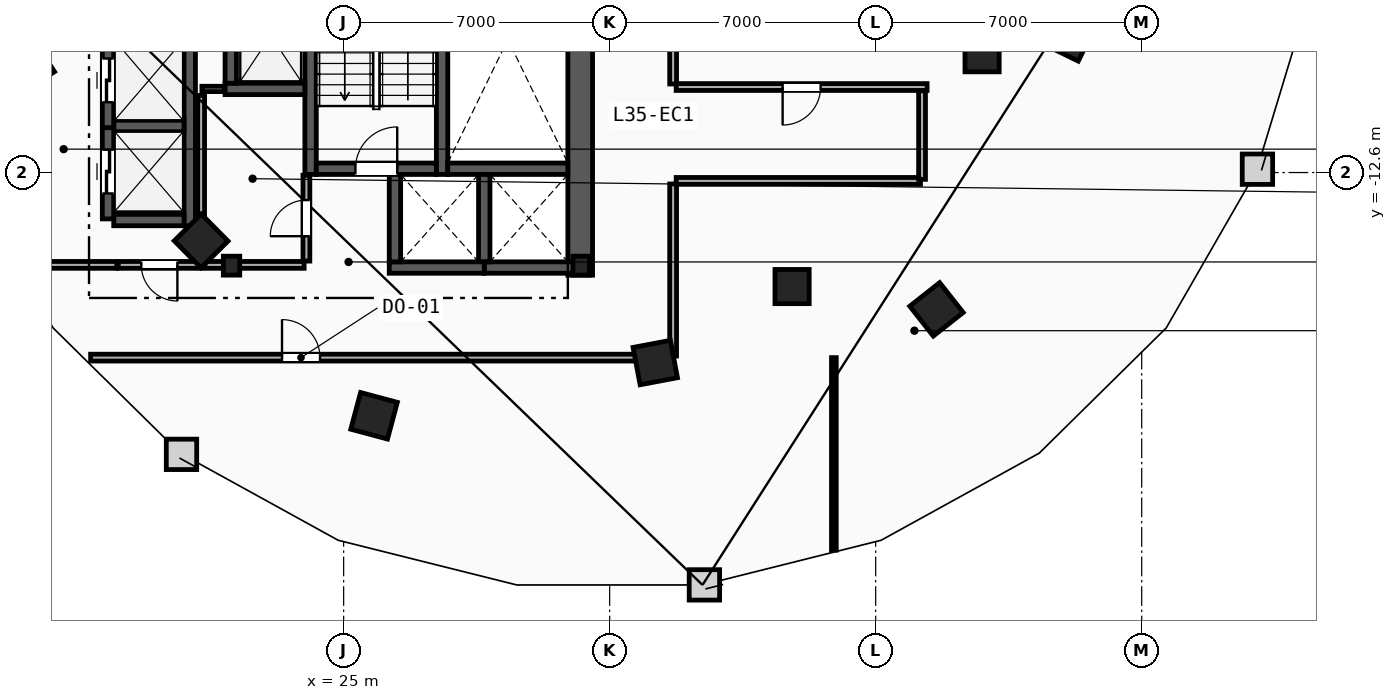
"""IFC4 building model, lengths in metres.
Left out: names, types, materials, properties, quantities, classifications, styles, units other than length and angle.
Written with IfcOpenShell. Run it as: python <this file> out.ifc"""

import sys

from ifc_helpers import new_model, si_unit, direction, frame, frame_2d, origin, origin_2d, place, context, subcontext, project, spatial, rectangle, i_section, extrude, element, fill, save


model = new_model("IFC4")
c1 = context("Model", 3, precision=1e-05, world=origin(), true_north=direction((0.0, 1.0)))
c2 = subcontext(c1, "Body", "Model", "MODEL_VIEW")
j1 = project(units=[si_unit("LENGTHUNIT", "METRE"), si_unit("PLANEANGLEUNIT", "RADIAN")], contexts=[c1])
p1 = place(None, origin())
s1 = spatial("IfcSite", under=j1, at=p1, CompositionType="ELEMENT")
p2 = place(p1, origin())
s2 = spatial("IfcBuilding", under=s1, at=p2, CompositionType="ELEMENT")
p3 = place(p2, frame((0.0, 0.0, 136.8)))
s3 = spatial("IfcBuildingStorey", under=s2, at=p3, CompositionType="ELEMENT", Elevation=136.8)
for number, where, z_axis, x_axis in (
    (1, (22.05, -15.05, 0.0), (0.0, 0.0, 1.0), (1.0, 0.0, 0.0)),
    (2, (31.25, -15.05, 0.0), (0.0, 0.0, 1.0), (1.0, 0.0, 0.0)),
):
    element("IfcColumn", number, at=place(p3, frame(where, z_axis=z_axis, x_axis=x_axis)), inside=s3, PredefinedType="COLUMN", context=c2, shape_type="SweptSolid", body=[
        extrude(i_section(OverallWidth=0.432, OverallDepth=0.498, WebThickness=0.056, FlangeThickness=0.089, FilletRadius=0.018, at=origin_2d()), origin(), (0.0, 0.0, 1.0), 3.6),
    ])
for number, where, z_axis, x_axis in (
    (3, (41.8, -9.5, 0.0), (0.0, 0.0, 1.0), (1.0, 0.0, 0.0)),
    (4, (36.8, -15.6, 0.0), (0.0, 0.0, 1.0), (1.0, 0.0, 0.0)),
):
    element("IfcColumn", number, at=place(p3, frame(where, z_axis=z_axis, x_axis=x_axis)), inside=s3, PredefinedType="COLUMN", context=c2, shape_type="SweptSolid", body=[
        extrude(rectangle(XDim=0.9, YDim=0.9, at=origin_2d()), origin(), (0.0, 0.0, 1.0), 3.6),
    ])
for number, where, z_axis, x_axis in (
    (5, (16.7, -9.8, 0.0), (0.0, 0.0, 1.0), (0.544, -0.839, 0.0)),
    (6, (21.25, -14.4, 0.0), (0.0, 0.0, 1.0), (0.703, -0.711, 0.0)),
    (7, (25.8, -19.0, 0.0), (0.0, 0.0, 1.0), (0.966, -0.259, 0.0)),
    (8, (33.2, -17.6, 0.0), (0.0, 0.0, 1.0), (0.983, 0.186, 0.0)),
    (9, (40.6, -16.2, 0.0), (0.0, 0.0, 1.0), (0.785, 0.619, 0.0)),
    (10, (44.1, -9.0, 0.0), (0.0, 0.0, 1.0), (0.437, 0.899, 0.0)),
):
    element("IfcColumn", number, at=place(p3, frame(where, z_axis=z_axis, x_axis=x_axis)), inside=s3, PredefinedType="COLUMN", context=c2, shape_type="SweptSolid", body=[
        extrude(rectangle(XDim=1.0, YDim=1.0, at=origin_2d()), origin(), (0.0, 0.0, 1.0), 3.6),
    ])
p4 = place(p3, frame((31.225, -15.3, 0.0), z_axis=(0.0, 0.0, 1.0), x_axis=(0.0, 1.0, 0.0)))
e11 = element("IfcWall", 11, at=p4, inside=s3, PredefinedType="SHEAR", context=c2, shape_type="SweptSolid", body=[
    extrude(rectangle(XDim=13.33, YDim=0.65, at=frame_2d((6.665, 0.0))), origin(), (0.0, 0.0, 1.0), 3.36),
])
for number, where, z_axis, x_axis in (
    (12, (27.59, -12.65, 0.0), (0.0, 0.0, 1.0), (0.0, 1.0, 0.0)),
    (13, (24.13, -12.65, 0.0), (0.0, 0.0, 1.0), (0.0, 1.0, 0.0)),
):
    element("IfcWall", number, at=place(p3, frame(where, z_axis=z_axis, x_axis=x_axis)), inside=s3, PredefinedType="SHEAR", context=c2, shape_type="SweptSolid", body=[
        extrude(rectangle(XDim=10.68, YDim=0.3, at=frame_2d((5.34, 0.0))), origin(), (0.0, 0.0, 1.0), 3.36),
    ])
p5 = place(p3, frame((27.74, -12.5, 0.0), z_axis=(0.0, 0.0, 1.0), x_axis=(1.0, 0.0, 0.0)))
e14 = element("IfcWall", 14, at=p5, inside=s3, PredefinedType="SHEAR", context=c2, shape_type="SweptSolid", body=[
    extrude(rectangle(XDim=3.16, YDim=0.3, at=frame_2d((1.58, 0.0))), origin(), (0.0, 0.0, 1.0), 3.36),
])
p6 = place(p3, frame((24.28, -12.5, 0.0), z_axis=(0.0, 0.0, 1.0), x_axis=(1.0, 0.0, 0.0)))
e15 = element("IfcWall", 15, at=p6, inside=s3, PredefinedType="SHEAR", context=c2, shape_type="SweptSolid", body=[
    extrude(rectangle(XDim=3.16, YDim=0.3, at=frame_2d((1.58, 0.0))), origin(), (0.0, 0.0, 1.0), 3.36),
])
p7 = place(p6, frame((1.03, 0.0, 0.0)))
e16 = element("IfcOpeningElement", 16, at=p7, cuts=e15, PredefinedType="OPENING", context=c2, shape_type="SweptSolid", body=[
    extrude(rectangle(XDim=1.1, YDim=2.15, at=frame_2d((0.55, 1.075))), frame((0.0, 0.16, 0.0), z_axis=(0.0, -1.0, 0.0), x_axis=(1.0, 0.0, 0.0)), (0.0, 0.0, 1.0), 0.32),
])
p8 = place(p3, frame((21.88, -10.4, 0.0), z_axis=(0.0, 0.0, 1.0), x_axis=(1.0, 0.0, 0.0)))
e17 = element("IfcWall", 17, at=p8, inside=s3, PredefinedType="SHEAR", context=c2, shape_type="SweptSolid", body=[
    extrude(rectangle(XDim=2.1, YDim=0.3, at=frame_2d((1.05, 0.0))), origin(), (0.0, 0.0, 1.0), 3.36),
])
for number, where, z_axis, x_axis in (
    (18, (22.03, -10.25, 0.0), (0.0, 0.0, 1.0), (0.0, 1.0, 0.0)),
    (19, (28.7, -15.1, 0.0), (0.0, 0.0, 1.0), (1.0, 0.0, 0.0)),
):
    element("IfcWall", number, at=place(p3, frame(where, z_axis=z_axis, x_axis=x_axis)), inside=s3, PredefinedType="SHEAR", context=c2, shape_type="SweptSolid", body=[
        extrude(rectangle(XDim=2.5, YDim=0.3, at=frame_2d((1.25, 0.0))), origin(), (0.0, 0.0, 1.0), 3.36),
    ])
p9 = place(p3, frame((28.7, -14.95, 0.0), z_axis=(0.0, 0.0, 1.0), x_axis=(0.0, 1.0, 0.0)))
e20 = element("IfcWall", 20, at=p9, inside=s3, PredefinedType="SHEAR", context=c2, shape_type="SweptSolid", body=[
    extrude(rectangle(XDim=2.3, YDim=0.3, at=frame_2d((1.15, 0.0))), origin(), (0.0, 0.0, 1.0), 3.36),
])
p10 = place(p3, frame((26.2, -15.1, 0.0), z_axis=(0.0, 0.0, 1.0), x_axis=(1.0, 0.0, 0.0)))
e21 = element("IfcWall", 21, at=p10, inside=s3, PredefinedType="SHEAR", context=c2, shape_type="SweptSolid", body=[
    extrude(rectangle(XDim=2.5, YDim=0.3, at=frame_2d((1.25, 0.0))), origin(), (0.0, 0.0, 1.0), 3.36),
])
p11 = place(p3, frame((26.35, -14.95, 0.0), z_axis=(0.0, 0.0, 1.0), x_axis=(0.0, 1.0, 0.0)))
e22 = element("IfcWall", 22, at=p11, inside=s3, PredefinedType="SHEAR", context=c2, shape_type="SweptSolid", body=[
    extrude(rectangle(XDim=2.3, YDim=0.3, at=frame_2d((1.15, 0.0))), origin(), (0.0, 0.0, 1.0), 3.36),
])
p12 = place(p3, frame((20.95, -14.0, 0.0), z_axis=(0.0, 0.0, 1.0), x_axis=(0.0, 1.0, 0.0)))
e23 = element("IfcWall", 23, at=p12, inside=s3, PredefinedType="SHEAR", context=c2, shape_type="SweptSolid", body=[
    extrude(rectangle(XDim=5.25, YDim=0.3, at=frame_2d((2.625, 0.0))), origin(), (0.0, 0.0, 1.0), 3.36),
])
for number, where, z_axis, x_axis in (
    (24, (18.95, -13.85, 0.0), (0.0, 0.0, 1.0), (1.0, 0.0, 0.0)),
    (25, (18.95, -11.375, 0.0), (0.0, 0.0, 1.0), (1.0, 0.0, 0.0)),
):
    element("IfcWall", number, at=place(p3, frame(where, z_axis=z_axis, x_axis=x_axis)), inside=s3, PredefinedType="SHEAR", context=c2, shape_type="SweptSolid", body=[
        extrude(rectangle(XDim=1.85, YDim=0.3, at=frame_2d((0.925, 0.0))), origin(), (0.0, 0.0, 1.0), 3.36),
    ])
p13 = place(p3, frame((18.8, -13.82, 0.0), z_axis=(0.0, 0.0, 1.0), x_axis=(0.0, 1.0, 0.0)))
e26 = element("IfcWall", 26, at=p13, inside=s3, PredefinedType="SHEAR", context=c2, shape_type="SweptSolid", body=[
    extrude(rectangle(XDim=2.49, YDim=0.3, at=frame_2d((1.245, 0.0))), origin(), (0.0, 0.0, 1.0), 3.36),
])
p14 = place(p13, frame((0.67, 0.0, 0.0)))
e27 = element("IfcOpeningElement", 27, at=p14, cuts=e26, PredefinedType="OPENING", context=c2, shape_type="SweptSolid", body=[
    extrude(rectangle(XDim=1.15, YDim=2.2, at=frame_2d((0.575, 1.1))), frame((0.0, 0.16, 0.0), z_axis=(0.0, -1.0, 0.0), x_axis=(1.0, 0.0, 0.0)), (0.0, 0.0, 1.0), 0.32),
])
p15 = place(p3, frame((18.8, -11.42, 0.0), z_axis=(0.0, 0.0, 1.0), x_axis=(0.0, 1.0, 0.0)))
e28 = element("IfcWall", 28, at=p15, inside=s3, PredefinedType="SHEAR", context=c2, shape_type="SweptSolid", body=[
    extrude(rectangle(XDim=2.49, YDim=0.3, at=frame_2d((1.245, 0.0))), origin(), (0.0, 0.0, 1.0), 3.36),
])
p16 = place(p15, frame((0.67, 0.0, 0.0)))
e29 = element("IfcOpeningElement", 29, at=p16, cuts=e28, PredefinedType="OPENING", context=c2, shape_type="SweptSolid", body=[
    extrude(rectangle(XDim=1.15, YDim=2.2, at=frame_2d((0.575, 1.1))), frame((0.0, 0.16, 0.0), z_axis=(0.0, -1.0, 0.0), x_axis=(1.0, 0.0, 0.0)), (0.0, 0.0, 1.0), 0.32),
])
p17 = place(p3, frame((17.04, -15.03, 0.0), z_axis=(0.0, 0.0, 1.0), x_axis=(1.0, 0.0, 0.0)))
e30 = element("IfcWall", 30, at=p17, inside=s3, PredefinedType="PARTITIONING", context=c2, shape_type="SweptSolid", body=[
    extrude(rectangle(XDim=1.99, YDim=0.18, at=frame_2d((0.995, 0.0))), origin(), (0.0, 0.0, 1.0), 3.36),
])
p18 = place(p3, frame((21.23, -15.03, 0.0), z_axis=(0.0, 0.0, 1.0), x_axis=(-1.0, 0.0, 0.0)))
e31 = element("IfcWall", 31, at=p18, inside=s3, PredefinedType="PARTITIONING", context=c2, shape_type="SweptSolid", body=[
    extrude(rectangle(XDim=2.16, YDim=0.18, at=frame_2d((1.08, 0.0))), origin(), (0.0, 0.0, 1.0), 3.36),
])
p19 = place(p18, frame((0.605, 0.0, 0.0)))
e32 = element("IfcOpeningElement", 32, at=p19, cuts=e31, PredefinedType="OPENING", context=c2, shape_type="SweptSolid", body=[
    extrude(rectangle(XDim=0.95, YDim=2.1, at=frame_2d((0.475, 1.05))), frame((0.0, 0.1, 0.0), z_axis=(0.0, -1.0, 0.0), x_axis=(1.0, 0.0, 0.0)), (0.0, 0.0, 1.0), 0.2),
])
p20 = place(p3, frame((21.27, -10.4, 0.0), z_axis=(0.0, 0.0, 1.0), x_axis=(1.0, 0.0, 0.0)))
e33 = element("IfcWall", 33, at=p20, inside=s3, PredefinedType="PARTITIONING", context=c2, shape_type="SweptSolid", body=[
    extrude(rectangle(XDim=0.59, YDim=0.14, at=frame_2d((0.295, 0.0))), origin(), (0.0, 0.0, 1.0), 3.36),
])
p21 = place(p3, frame((21.25, -14.93, 0.0), z_axis=(0.0, 0.0, 1.0), x_axis=(0.0, 1.0, 0.0)))
e34 = element("IfcWall", 34, at=p21, inside=s3, PredefinedType="PARTITIONING", context=c2, shape_type="SweptSolid", body=[
    extrude(rectangle(XDim=4.36, YDim=0.18, at=frame_2d((2.18, 0.0))), origin(), (0.0, 0.0, 1.0), 3.36),
])
p22 = place(p3, frame((21.35, -15.03, 0.0), z_axis=(0.0, 0.0, 1.0), x_axis=(1.0, 0.0, 0.0)))
e35 = element("IfcWall", 35, at=p22, inside=s3, PredefinedType="PARTITIONING", context=c2, shape_type="SweptSolid", body=[
    extrude(rectangle(XDim=2.61, YDim=0.18, at=frame_2d((1.305, 0.0))), origin(), (0.0, 0.0, 1.0), 2.433),
])
p23 = place(p3, frame((24.02, -14.93, 0.0), z_axis=(0.0, 0.0, 1.0), x_axis=(0.0, 1.0, 0.0)))
e36 = element("IfcWall", 36, at=p23, inside=s3, PredefinedType="PARTITIONING", context=c2, shape_type="SweptSolid", body=[
    extrude(rectangle(XDim=2.26, YDim=0.18, at=frame_2d((1.13, 0.0))), origin(), (0.0, 0.0, 1.0), 3.36),
])
p24 = place(p23, frame((0.655, 0.0, 0.0)))
e37 = element("IfcOpeningElement", 37, at=p24, cuts=e36, PredefinedType="OPENING", context=c2, shape_type="SweptSolid", body=[
    extrude(rectangle(XDim=0.95, YDim=2.1, at=frame_2d((0.475, 1.05))), frame((0.0, 0.1, 0.0), z_axis=(0.0, -1.0, 0.0), x_axis=(1.0, 0.0, 0.0)), (0.0, 0.0, 1.0), 0.2),
])
p25 = place(p3, frame((37.9, -22.536, 0.0), z_axis=(0.0, 0.0, 1.0), x_axis=(0.0, 1.0, 0.0)))
e38 = element("IfcWall", 38, at=p25, inside=s3, PredefinedType="PARTITIONING", context=c2, shape_type="SweptSolid", body=[
    extrude(rectangle(XDim=5.066, YDim=0.125, at=frame_2d((2.533, 0.0))), origin(), (0.0, 0.0, 1.0), 3.36),
])
p26 = place(p3, frame((18.342, -17.47, 0.0), z_axis=(0.0, 0.0, 1.0), x_axis=(1.0, 0.0, 0.0)))
e39 = element("IfcWall", 39, at=p26, inside=s3, PredefinedType="PARTITIONING", context=c2, shape_type="SweptSolid", body=[
    extrude(rectangle(XDim=15.287, YDim=0.18, at=frame_2d((7.643, 0.0))), origin(), (0.0, 0.0, 1.0), 3.36),
])
p27 = place(p26, frame((5.036, 0.0, 0.0)))
e40 = element("IfcOpeningElement", 40, at=p27, cuts=e39, PredefinedType="OPENING", context=c2, shape_type="SweptSolid", body=[
    extrude(rectangle(XDim=1.0, YDim=2.15, at=frame_2d((0.5, 1.075))), frame((0.0, 0.1, 0.0), z_axis=(0.0, -1.0, 0.0), x_axis=(1.0, 0.0, 0.0)), (0.0, 0.0, 1.0), 0.2),
])
p28 = place(p3, frame((33.75, -12.82, 0.0), z_axis=(0.0, 0.0, 1.0), x_axis=(1.0, 0.0, 0.0)))
e41 = element("IfcWall", 41, at=p28, inside=s3, PredefinedType="PARTITIONING", context=c2, shape_type="SweptSolid", body=[
    extrude(rectangle(XDim=6.428, YDim=0.18, at=frame_2d((3.214, 0.0))), origin(), (0.0, 0.0, 1.0), 3.36),
])
p29 = place(p3, frame((33.67, -17.428, 0.0), z_axis=(0.0, 0.0, 1.0), x_axis=(0.0, 1.0, 0.0)))
e42 = element("IfcWall", 42, at=p29, inside=s3, PredefinedType="PARTITIONING", context=c2, shape_type="SweptSolid", body=[
    extrude(rectangle(XDim=4.529, YDim=0.18, at=frame_2d((2.264, 0.0))), origin(), (0.0, 0.0, 1.0), 3.36),
])
p30 = place(p3, frame((40.22, -12.779, 0.0), z_axis=(0.0, 0.0, 1.0), x_axis=(0.0, 1.0, 0.0)))
e43 = element("IfcWall", 43, at=p30, inside=s3, PredefinedType="PARTITIONING", context=c2, shape_type="SweptSolid", body=[
    extrude(rectangle(XDim=2.329, YDim=0.18, at=frame_2d((1.164, 0.0))), origin(), (0.0, 0.0, 1.0), 3.36),
])
p31 = place(p3, frame((40.353, -10.35, 0.0), z_axis=(0.0, 0.0, 1.0), x_axis=(-1.0, 0.0, 0.0)))
e44 = element("IfcWall", 44, at=p31, inside=s3, PredefinedType="PARTITIONING", context=c2, shape_type="SweptSolid", body=[
    extrude(rectangle(XDim=6.603, YDim=0.18, at=frame_2d((3.301, 0.0))), origin(), (0.0, 0.0, 1.0), 3.36),
])
p32 = place(p31, frame((2.802, 0.0, 0.0)))
e45 = element("IfcOpeningElement", 45, at=p32, cuts=e44, PredefinedType="OPENING", context=c2, shape_type="SweptSolid", body=[
    extrude(rectangle(XDim=1.0, YDim=2.15, at=frame_2d((0.5, 1.075))), frame((0.0, 0.1, 0.0), z_axis=(0.0, -1.0, 0.0), x_axis=(1.0, 0.0, 0.0)), (0.0, 0.0, 1.0), 0.2),
])
p33 = place(p3, frame((33.67, -10.27, 0.0), z_axis=(0.0, 0.0, 1.0), x_axis=(0.0, 1.0, 0.0)))
e46 = element("IfcWall", 46, at=p33, inside=s3, PredefinedType="PARTITIONING", context=c2, shape_type="SweptSolid", body=[
    extrude(rectangle(XDim=1.269, YDim=0.18, at=frame_2d((0.634, 0.0))), origin(), (0.0, 0.0, 1.0), 3.36),
])
p34 = place(p7, origin())
e47 = element("IfcDoor", 47, at=p34, inside=s3, OperationType="SINGLE_SWING_RIGHT", PredefinedType="DOOR", context=c2, shape_type="SweptSolid", body=[
    extrude(rectangle(XDim=1.1, YDim=2.15, at=frame_2d((0.55, 1.075))), frame((0.0, 0.025, 0.0), z_axis=(0.0, -1.0, 0.0), x_axis=(1.0, 0.0, 0.0)), (0.0, 0.0, 1.0), 0.05),
])
fill(e16, e47)
p35 = place(p14, origin())
e48 = element("IfcDoor", 48, at=p35, inside=s3, OperationType="SLIDING_TO_LEFT", PredefinedType="TRAPDOOR", context=c2, shape_type="SweptSolid", body=[
    extrude(rectangle(XDim=1.15, YDim=2.2, at=frame_2d((0.575, 1.1))), frame((0.0, 0.025, 0.0), z_axis=(0.0, -1.0, 0.0), x_axis=(1.0, 0.0, 0.0)), (0.0, 0.0, 1.0), 0.05),
])
fill(e27, e48)
p36 = place(p16, origin())
e49 = element("IfcDoor", 49, at=p36, inside=s3, OperationType="SLIDING_TO_LEFT", PredefinedType="TRAPDOOR", context=c2, shape_type="SweptSolid", body=[
    extrude(rectangle(XDim=1.15, YDim=2.2, at=frame_2d((0.575, 1.1))), frame((0.0, 0.025, 0.0), z_axis=(0.0, -1.0, 0.0), x_axis=(1.0, 0.0, 0.0)), (0.0, 0.0, 1.0), 0.05),
])
fill(e29, e49)
p37 = place(p27, origin())
e50 = element("IfcDoor", 50, at=p37, inside=s3, OperationType="SINGLE_SWING_LEFT", PredefinedType="DOOR", context=c2, shape_type="SweptSolid", body=[
    extrude(rectangle(XDim=1.0, YDim=2.15, at=frame_2d((0.5, 1.075))), frame((0.0, 0.025, 0.0), z_axis=(0.0, -1.0, 0.0), x_axis=(1.0, 0.0, 0.0)), (0.0, 0.0, 1.0), 0.05),
])
fill(e40, e50)
p38 = place(p32, origin())
e51 = element("IfcDoor", 51, at=p38, inside=s3, OperationType="SINGLE_SWING_RIGHT", PredefinedType="DOOR", context=c2, shape_type="SweptSolid", body=[
    extrude(rectangle(XDim=1.0, YDim=2.15, at=frame_2d((0.5, 1.075))), frame((0.0, 0.025, 0.0), z_axis=(0.0, -1.0, 0.0), x_axis=(1.0, 0.0, 0.0)), (0.0, 0.0, 1.0), 0.05),
])
fill(e45, e51)
p39 = place(p24, origin())
e52 = element("IfcDoor", 52, at=p39, inside=s3, OperationType="SINGLE_SWING_LEFT", PredefinedType="DOOR", context=c2, shape_type="SweptSolid", body=[
    extrude(rectangle(XDim=0.95, YDim=2.1, at=frame_2d((0.475, 1.05))), frame((0.0, 0.025, 0.0), z_axis=(0.0, -1.0, 0.0), x_axis=(1.0, 0.0, 0.0)), (0.0, 0.0, 1.0), 0.05),
])
fill(e37, e52)
p40 = place(p19, origin())
e53 = element("IfcDoor", 53, at=p40, inside=s3, OperationType="SINGLE_SWING_LEFT", PredefinedType="DOOR", context=c2, shape_type="SweptSolid", body=[
    extrude(rectangle(XDim=0.95, YDim=2.1, at=frame_2d((0.475, 1.05))), frame((0.0, 0.025, 0.0), z_axis=(0.0, -1.0, 0.0), x_axis=(1.0, 0.0, 0.0)), (0.0, 0.0, 1.0), 0.05),
])
fill(e32, e53)
save(model, sys.argv[1])
